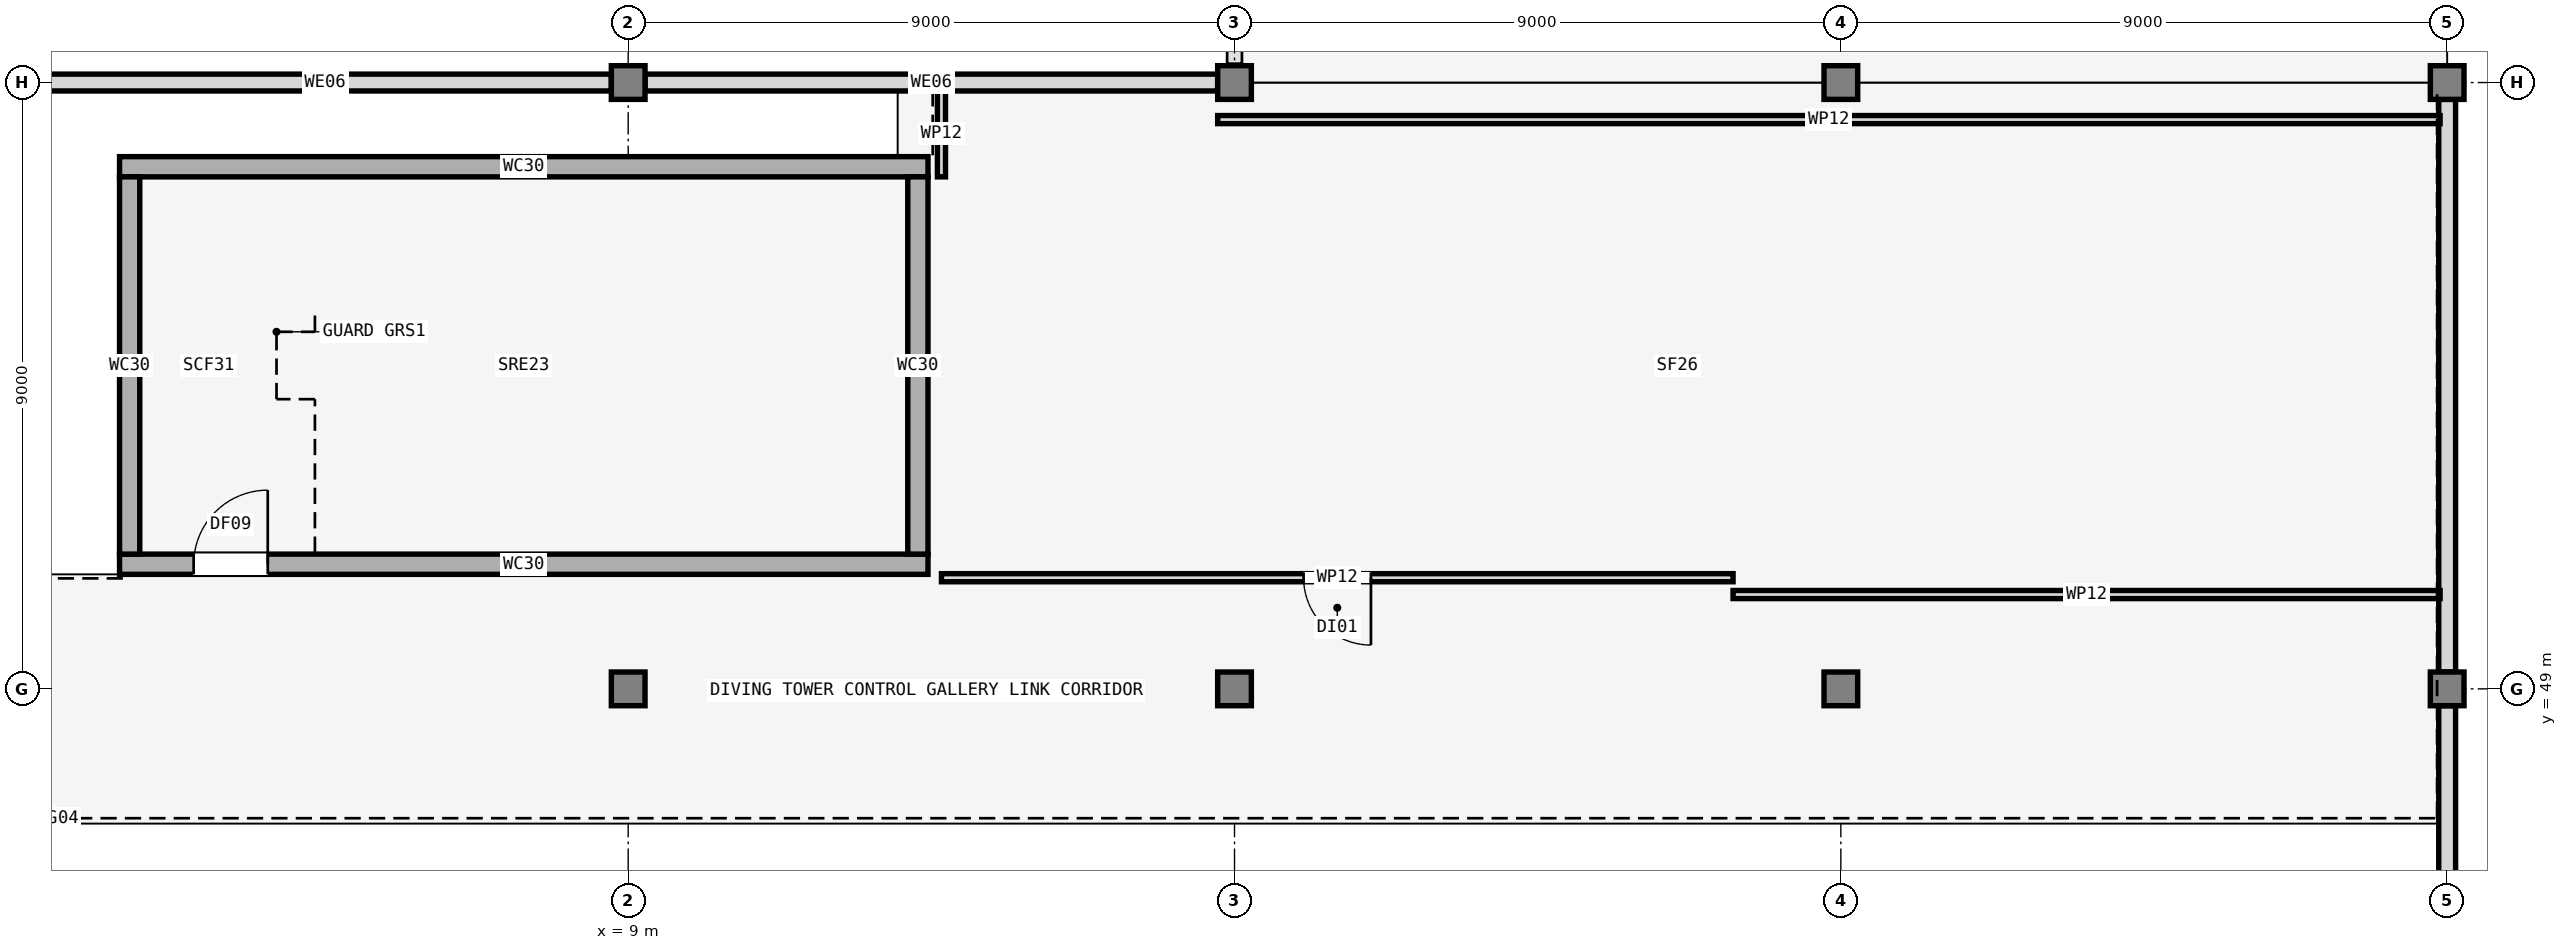
"""IFC4 building model, lengths in metres.
Left out: names, types, materials, properties, quantities, classifications, styles, units other than length and angle.
Written with IfcOpenShell. Run it as: python <this file> out.ifc"""

import sys

from ifc_helpers import new_model, si_unit, direction, frame, frame_2d, origin, origin_2d, place, context, subcontext, project, spatial, rectangle, extrude, element, fill, save


model = new_model("IFC4")
c1 = context("Model", 3, precision=1e-05, world=origin(), true_north=direction((0.0, 1.0)))
c2 = subcontext(c1, "Body", "Model", "MODEL_VIEW")
j1 = project(units=[si_unit("LENGTHUNIT", "METRE"), si_unit("PLANEANGLEUNIT", "RADIAN")], contexts=[c1])
p1 = place(None, origin())
s1 = spatial("IfcSite", under=j1, at=p1, CompositionType="ELEMENT")
p2 = place(p1, origin())
s2 = spatial("IfcBuilding", under=s1, at=p2, CompositionType="ELEMENT")
p3 = place(p2, frame((0.0, 0.0, 13.5)))
s3 = spatial("IfcBuildingStorey", under=s2, at=p3, CompositionType="ELEMENT", Elevation=13.5)
p4 = place(p3, frame((9.0, 49.0, 0.0), z_axis=(0.0, 0.0, 1.0), x_axis=(1.0, 0.0, 0.0)))
e1 = element("IfcColumn", 1, at=p4, inside=s3, PredefinedType="COLUMN", context=c2, shape_type="SweptSolid", body=[
    extrude(rectangle(XDim=0.5, YDim=0.5, at=origin_2d()), origin(), (0.0, 0.0, 1.0), 4.217),
])
p5 = place(p3, frame((9.0, 58.0, 0.0), z_axis=(0.0, 0.0, 1.0), x_axis=(1.0, 0.0, 0.0)))
e2 = element("IfcColumn", 2, at=p5, inside=s3, PredefinedType="COLUMN", context=c2, shape_type="SweptSolid", body=[
    extrude(rectangle(XDim=0.5, YDim=0.5, at=origin_2d()), origin(), (0.0, 0.0, 1.0), 2.15),
])
p6 = place(p3, frame((18.0, 49.0, 0.0), z_axis=(0.0, 0.0, 1.0), x_axis=(1.0, 0.0, 0.0)))
e3 = element("IfcColumn", 3, at=p6, inside=s3, PredefinedType="COLUMN", context=c2, shape_type="SweptSolid", body=[
    extrude(rectangle(XDim=0.5, YDim=0.5, at=origin_2d()), origin(), (0.0, 0.0, 1.0), 4.29),
])
p7 = place(p3, frame((18.0, 58.0, 0.0), z_axis=(0.0, 0.0, 1.0), x_axis=(1.0, 0.0, 0.0)))
e4 = element("IfcColumn", 4, at=p7, inside=s3, PredefinedType="COLUMN", context=c2, shape_type="SweptSolid", body=[
    extrude(rectangle(XDim=0.5, YDim=0.5, at=origin_2d()), origin(), (0.0, 0.0, 1.0), 2.15),
])
p8 = place(p3, frame((27.0, 49.0, 0.0), z_axis=(0.0, 0.0, 1.0), x_axis=(1.0, 0.0, 0.0)))
e5 = element("IfcColumn", 5, at=p8, inside=s3, PredefinedType="COLUMN", context=c2, shape_type="SweptSolid", body=[
    extrude(rectangle(XDim=0.5, YDim=0.5, at=origin_2d()), origin(), (0.0, 0.0, 1.0), 4.217),
])
p9 = place(p3, frame((27.0, 58.0, 0.0), z_axis=(0.0, 0.0, 1.0), x_axis=(1.0, 0.0, 0.0)))
e6 = element("IfcColumn", 6, at=p9, inside=s3, PredefinedType="COLUMN", context=c2, shape_type="SweptSolid", body=[
    extrude(rectangle(XDim=0.5, YDim=0.5, at=origin_2d()), origin(), (0.0, 0.0, 1.0), 2.15),
])
p10 = place(p3, frame((36.0, 49.0, 0.0), z_axis=(0.0, 0.0, 1.0), x_axis=(1.0, 0.0, 0.0)))
e7 = element("IfcColumn", 7, at=p10, inside=s3, PredefinedType="COLUMN", context=c2, shape_type="SweptSolid", body=[
    extrude(rectangle(XDim=0.5, YDim=0.5, at=origin_2d()), origin(), (0.0, 0.0, 1.0), 4.04),
])
p11 = place(p3, frame((36.0, 58.0, 0.0), z_axis=(0.0, 0.0, 1.0), x_axis=(1.0, 0.0, 0.0)))
e8 = element("IfcColumn", 8, at=p11, inside=s3, PredefinedType="COLUMN", context=c2, shape_type="SweptSolid", body=[
    extrude(rectangle(XDim=0.5, YDim=0.5, at=origin_2d()), origin(), (0.0, 0.0, 1.0), 2.15),
])
for number, where, z_axis, x_axis in (
    (9, (8.75, 58.0, -0.26), (0.0, 0.0, 1.0), (-1.0, 0.0, 0.0)),
    (10, (17.75, 58.0, -0.26), (0.0, 0.0, 1.0), (-1.0, 0.0, 0.0)),
    (11, (36.0, 40.25, -0.26), (0.0, 0.0, 1.0), (0.0, 1.0, 0.0)),
):
    element("IfcWall", number, at=place(p3, frame(where, z_axis=z_axis, x_axis=x_axis)), inside=s3, PredefinedType="SOLIDWALL", context=c2, shape_type="SweptSolid", body=[
        extrude(rectangle(XDim=8.5, YDim=0.25, at=frame_2d((4.25, 0.0))), origin(), (0.0, 0.0, 1.0), 2.38),
    ])
p12 = place(p3, frame((36.0, 49.25, 0.0), z_axis=(0.0, 0.0, 1.0), x_axis=(0.0, 1.0, 0.0)))
e12 = element("IfcWall", 12, at=p12, inside=s3, PredefinedType="SOLIDWALL", context=c2, shape_type="SweptSolid", body=[
    extrude(rectangle(XDim=8.5, YDim=0.25, at=frame_2d((4.25, 0.0))), origin(), (0.0, 0.0, 1.0), 2.12),
])
p13 = place(p3, frame((1.45, 50.85, 0.0), z_axis=(0.0, 0.0, 1.0), x_axis=(1.0, 0.0, 0.0)))
e13 = element("IfcWall", 13, at=p13, inside=s3, PredefinedType="SHEAR", context=c2, shape_type="SweptSolid", body=[
    extrude(rectangle(XDim=12.0, YDim=0.3, at=frame_2d((6.0, 0.0))), origin(), (0.0, 0.0, 1.0), 2.12),
])
p14 = place(p13, frame((1.1, 0.0, 0.0)))
e14 = element("IfcOpeningElement", 14, at=p14, cuts=e13, PredefinedType="OPENING", context=c2, shape_type="SweptSolid", body=[
    extrude(rectangle(XDim=1.1, YDim=2.0, at=frame_2d((0.55, 1.0))), frame((0.0, 0.16, 0.0), z_axis=(0.0, -1.0, 0.0), x_axis=(1.0, 0.0, 0.0)), (0.0, 0.0, 1.0), 0.32),
])
p15 = place(p3, frame((13.45, 56.75, 0.0), z_axis=(0.0, 0.0, 1.0), x_axis=(-1.0, 0.0, 0.0)))
e15 = element("IfcWall", 15, at=p15, inside=s3, PredefinedType="SHEAR", context=c2, shape_type="SweptSolid", body=[
    extrude(rectangle(XDim=12.0, YDim=0.3, at=frame_2d((6.0, 0.0))), origin(), (0.0, 0.0, 1.0), 2.12),
])
for number, where, z_axis, x_axis in (
    (16, (1.6, 56.6, 0.0), (0.0, 0.0, 1.0), (0.0, -1.0, 0.0)),
    (17, (13.3, 51.0, 0.0), (0.0, 0.0, 1.0), (0.0, 1.0, 0.0)),
):
    element("IfcWall", number, at=place(p3, frame(where, z_axis=z_axis, x_axis=x_axis)), inside=s3, PredefinedType="SHEAR", context=c2, shape_type="SweptSolid", body=[
        extrude(rectangle(XDim=5.6, YDim=0.3, at=frame_2d((2.8, 0.0))), origin(), (0.0, 0.0, 1.0), 2.12),
    ])
p16 = place(p3, frame((25.4, 50.65, 0.0), z_axis=(0.0, 0.0, 1.0), x_axis=(-1.0, 0.0, 0.0)))
e18 = element("IfcWall", 18, at=p16, inside=s3, PredefinedType="PARTITIONING", context=c2, shape_type="SweptSolid", body=[
    extrude(rectangle(XDim=11.75, YDim=0.12, at=frame_2d((5.875, 0.0))), origin(), (0.0, 0.0, 1.0), 2.275),
])
p17 = place(p16, frame((5.375, 0.0, 0.0)))
e19 = element("IfcOpeningElement", 19, at=p17, cuts=e18, PredefinedType="OPENING", context=c2, shape_type="SweptSolid", body=[
    extrude(rectangle(XDim=1.0, YDim=2.1, at=frame_2d((0.5, 1.05))), frame((0.0, 0.07, 0.0), z_axis=(0.0, -1.0, 0.0), x_axis=(1.0, 0.0, 0.0)), (0.0, 0.0, 1.0), 0.14),
])
p18 = place(p3, frame((17.75, 57.45, 0.0), z_axis=(0.0, 0.0, 1.0), x_axis=(1.0, 0.0, 0.0)))
e20 = element("IfcWall", 20, at=p18, inside=s3, PredefinedType="PARTITIONING", context=c2, shape_type="SweptSolid", body=[
    extrude(rectangle(XDim=18.145, YDim=0.12, at=frame_2d((9.073, 0.0))), origin(), (0.0, 0.0, 1.0), 2.275),
])
p19 = place(p3, frame((35.895, 50.4, 0.0), z_axis=(0.0, 0.0, 1.0), x_axis=(-1.0, 0.0, 0.0)))
e21 = element("IfcWall", 21, at=p19, inside=s3, PredefinedType="PARTITIONING", context=c2, shape_type="SweptSolid", body=[
    extrude(rectangle(XDim=10.495, YDim=0.12, at=frame_2d((5.248, 0.0))), origin(), (0.0, 0.0, 1.0), 2.275),
])
p20 = place(p3, frame((13.65, 56.6, 0.0), z_axis=(0.0, 0.0, 1.0), x_axis=(0.0, 1.0, 0.0)))
e22 = element("IfcWall", 22, at=p20, inside=s3, PredefinedType="PARTITIONING", context=c2, shape_type="SweptSolid", body=[
    extrude(rectangle(XDim=1.295, YDim=0.12, at=frame_2d((0.647, 0.0))), origin(), (0.0, 0.0, 1.0), 3.12),
])
p21 = place(p14, origin())
e23 = element("IfcDoor", 23, at=p21, inside=s3, OperationType="SINGLE_SWING_RIGHT", PredefinedType="DOOR", context=c2, shape_type="SweptSolid", body=[
    extrude(rectangle(XDim=1.1, YDim=2.0, at=frame_2d((0.55, 1.0))), frame((0.0, 0.025, 0.0), z_axis=(0.0, -1.0, 0.0), x_axis=(1.0, 0.0, 0.0)), (0.0, 0.0, 1.0), 0.05),
])
fill(e14, e23)
p22 = place(p17, origin())
e24 = element("IfcDoor", 24, at=p22, inside=s3, OperationType="SINGLE_SWING_LEFT", PredefinedType="DOOR", context=c2, shape_type="SweptSolid", body=[
    extrude(rectangle(XDim=1.0, YDim=2.1, at=frame_2d((0.5, 1.05))), frame((0.0, 0.025, 0.0), z_axis=(0.0, -1.0, 0.0), x_axis=(1.0, 0.0, 0.0)), (0.0, 0.0, 1.0), 0.05),
])
fill(e19, e24)
save(model, sys.argv[1])
